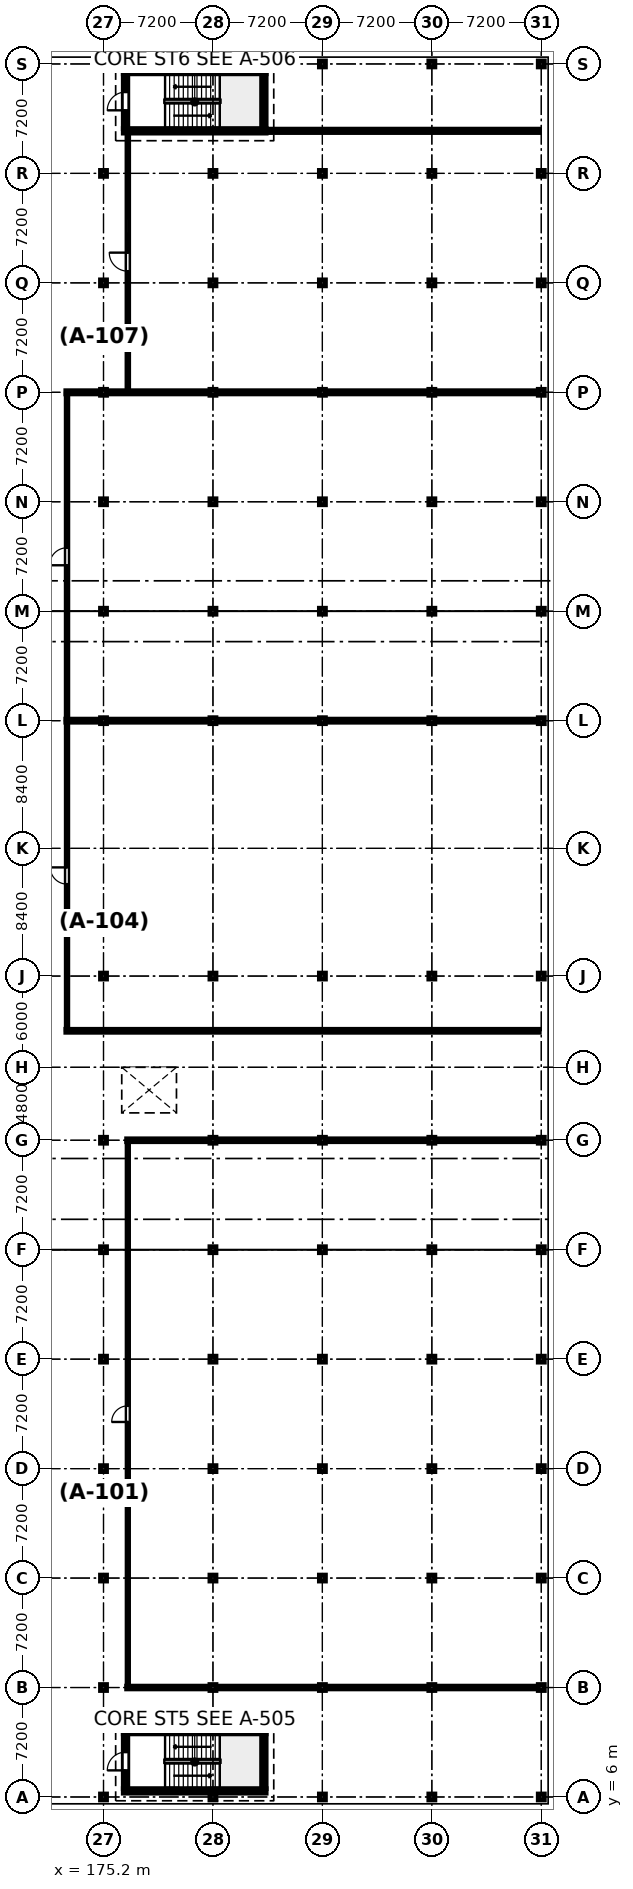
"""IFC4 building model, lengths in metres.
Left out: names, types, materials, properties, quantities, classifications, styles, units other than length and angle.
Written with IfcOpenShell. Run it as: python <this file> out.ifc"""

import sys

from ifc_helpers import new_model, si_unit, direction, frame, frame_2d, origin, origin_2d, place, context, subcontext, project, spatial, rectangle, i_section, extrude, element, fill, save


model = new_model("IFC4")
c1 = context("Model", 3, precision=1e-05, world=origin(), true_north=direction((0.0, 1.0)))
c2 = subcontext(c1, "Body", "Model", "MODEL_VIEW")
j1 = project(units=[si_unit("LENGTHUNIT", "METRE"), si_unit("PLANEANGLEUNIT", "RADIAN")], contexts=[c1])
p1 = place(None, origin())
s1 = spatial("IfcSite", under=j1, at=p1, CompositionType="ELEMENT")
p2 = place(p1, origin())
s2 = spatial("IfcBuilding", under=s1, at=p2, CompositionType="ELEMENT")
p3 = place(p2, frame((0.0, 0.0, -4.5)))
s3 = spatial("IfcBuildingStorey", under=s2, at=p3, CompositionType="ELEMENT", Elevation=-4.5)
for number, where, z_axis, x_axis in (
    (1, (175.2, 6.0, 0.0), (0.0, 0.0, 1.0), (1.0, 0.0, 0.0)),
    (2, (175.2, 13.2, 0.0), (0.0, 0.0, 1.0), (1.0, 0.0, 0.0)),
    (3, (175.2, 20.4, 0.0), (0.0, 0.0, 1.0), (1.0, 0.0, 0.0)),
    (4, (175.2, 27.6, 0.0), (0.0, 0.0, 1.0), (1.0, 0.0, 0.0)),
    (5, (175.2, 34.8, 0.0), (0.0, 0.0, 1.0), (1.0, 0.0, 0.0)),
    (6, (175.2, 42.0, 0.0), (0.0, 0.0, 1.0), (1.0, 0.0, 0.0)),
    (7, (175.2, 49.2, 0.0), (0.0, 0.0, 1.0), (1.0, 0.0, 0.0)),
    (8, (175.2, 60.0, 0.0), (0.0, 0.0, 1.0), (1.0, 0.0, 0.0)),
    (9, (175.2, 76.8, 0.0), (0.0, 0.0, 1.0), (1.0, 0.0, 0.0)),
    (10, (175.2, 84.0, 0.0), (0.0, 0.0, 1.0), (1.0, 0.0, 0.0)),
    (11, (175.2, 91.2, 0.0), (0.0, 0.0, 1.0), (1.0, 0.0, 0.0)),
    (12, (175.2, 98.4, 0.0), (0.0, 0.0, 1.0), (1.0, 0.0, 0.0)),
    (13, (175.2, 105.6, 0.0), (0.0, 0.0, 1.0), (1.0, 0.0, 0.0)),
    (14, (175.2, 112.8, 0.0), (0.0, 0.0, 1.0), (1.0, 0.0, 0.0)),
    (15, (175.2, 120.0, 0.0), (0.0, 0.0, 1.0), (1.0, 0.0, 0.0)),
    (16, (182.4, 6.0, 0.0), (0.0, 0.0, 1.0), (1.0, 0.0, 0.0)),
    (17, (182.4, 13.2, 0.0), (0.0, 0.0, 1.0), (1.0, 0.0, 0.0)),
    (18, (182.4, 20.4, 0.0), (0.0, 0.0, 1.0), (1.0, 0.0, 0.0)),
    (19, (182.4, 27.6, 0.0), (0.0, 0.0, 1.0), (1.0, 0.0, 0.0)),
    (20, (182.4, 34.8, 0.0), (0.0, 0.0, 1.0), (1.0, 0.0, 0.0)),
    (21, (182.4, 42.0, 0.0), (0.0, 0.0, 1.0), (1.0, 0.0, 0.0)),
    (22, (182.4, 49.2, 0.0), (0.0, 0.0, 1.0), (1.0, 0.0, 0.0)),
    (23, (182.4, 60.0, 0.0), (0.0, 0.0, 1.0), (1.0, 0.0, 0.0)),
    (24, (182.4, 76.8, 0.0), (0.0, 0.0, 1.0), (1.0, 0.0, 0.0)),
    (25, (182.4, 84.0, 0.0), (0.0, 0.0, 1.0), (1.0, 0.0, 0.0)),
    (26, (182.4, 91.2, 0.0), (0.0, 0.0, 1.0), (1.0, 0.0, 0.0)),
    (27, (182.4, 98.4, 0.0), (0.0, 0.0, 1.0), (1.0, 0.0, 0.0)),
    (28, (182.4, 105.6, 0.0), (0.0, 0.0, 1.0), (1.0, 0.0, 0.0)),
    (29, (182.4, 112.8, 0.0), (0.0, 0.0, 1.0), (1.0, 0.0, 0.0)),
    (30, (182.4, 120.0, 0.0), (0.0, 0.0, 1.0), (1.0, 0.0, 0.0)),
    (31, (189.6, 6.0, 0.0), (0.0, 0.0, 1.0), (1.0, 0.0, 0.0)),
    (32, (189.6, 13.2, 0.0), (0.0, 0.0, 1.0), (1.0, 0.0, 0.0)),
    (33, (189.6, 20.4, 0.0), (0.0, 0.0, 1.0), (1.0, 0.0, 0.0)),
    (34, (189.6, 27.6, 0.0), (0.0, 0.0, 1.0), (1.0, 0.0, 0.0)),
    (35, (189.6, 34.8, 0.0), (0.0, 0.0, 1.0), (1.0, 0.0, 0.0)),
    (36, (189.6, 42.0, 0.0), (0.0, 0.0, 1.0), (1.0, 0.0, 0.0)),
    (37, (189.6, 49.2, 0.0), (0.0, 0.0, 1.0), (1.0, 0.0, 0.0)),
    (38, (189.6, 60.0, 0.0), (0.0, 0.0, 1.0), (1.0, 0.0, 0.0)),
    (39, (189.6, 76.8, 0.0), (0.0, 0.0, 1.0), (1.0, 0.0, 0.0)),
    (40, (189.6, 84.0, 0.0), (0.0, 0.0, 1.0), (1.0, 0.0, 0.0)),
    (41, (189.6, 91.2, 0.0), (0.0, 0.0, 1.0), (1.0, 0.0, 0.0)),
    (42, (189.6, 98.4, 0.0), (0.0, 0.0, 1.0), (1.0, 0.0, 0.0)),
    (43, (189.6, 105.6, 0.0), (0.0, 0.0, 1.0), (1.0, 0.0, 0.0)),
    (44, (189.6, 112.8, 0.0), (0.0, 0.0, 1.0), (1.0, 0.0, 0.0)),
    (45, (189.6, 120.0, 0.0), (0.0, 0.0, 1.0), (1.0, 0.0, 0.0)),
    (46, (196.8, 6.0, 0.0), (0.0, 0.0, 1.0), (1.0, 0.0, 0.0)),
    (47, (196.8, 13.2, 0.0), (0.0, 0.0, 1.0), (1.0, 0.0, 0.0)),
    (48, (196.8, 20.4, 0.0), (0.0, 0.0, 1.0), (1.0, 0.0, 0.0)),
    (49, (196.8, 27.6, 0.0), (0.0, 0.0, 1.0), (1.0, 0.0, 0.0)),
    (50, (196.8, 34.8, 0.0), (0.0, 0.0, 1.0), (1.0, 0.0, 0.0)),
    (51, (196.8, 42.0, 0.0), (0.0, 0.0, 1.0), (1.0, 0.0, 0.0)),
    (52, (196.8, 49.2, 0.0), (0.0, 0.0, 1.0), (1.0, 0.0, 0.0)),
    (53, (196.8, 60.0, 0.0), (0.0, 0.0, 1.0), (1.0, 0.0, 0.0)),
    (54, (196.8, 76.8, 0.0), (0.0, 0.0, 1.0), (1.0, 0.0, 0.0)),
    (55, (196.8, 84.0, 0.0), (0.0, 0.0, 1.0), (1.0, 0.0, 0.0)),
    (56, (196.8, 91.2, 0.0), (0.0, 0.0, 1.0), (1.0, 0.0, 0.0)),
    (57, (196.8, 98.4, 0.0), (0.0, 0.0, 1.0), (1.0, 0.0, 0.0)),
    (58, (196.8, 105.6, 0.0), (0.0, 0.0, 1.0), (1.0, 0.0, 0.0)),
    (59, (196.8, 112.8, 0.0), (0.0, 0.0, 1.0), (1.0, 0.0, 0.0)),
    (60, (196.8, 120.0, 0.0), (0.0, 0.0, 1.0), (1.0, 0.0, 0.0)),
    (61, (204.0, 6.0, 0.0), (0.0, 0.0, 1.0), (1.0, 0.0, 0.0)),
    (62, (204.0, 13.2, 0.0), (0.0, 0.0, 1.0), (1.0, 0.0, 0.0)),
    (63, (204.0, 20.4, 0.0), (0.0, 0.0, 1.0), (1.0, 0.0, 0.0)),
    (64, (204.0, 27.6, 0.0), (0.0, 0.0, 1.0), (1.0, 0.0, 0.0)),
    (65, (204.0, 34.8, 0.0), (0.0, 0.0, 1.0), (1.0, 0.0, 0.0)),
    (66, (204.0, 42.0, 0.0), (0.0, 0.0, 1.0), (1.0, 0.0, 0.0)),
    (67, (204.0, 49.2, 0.0), (0.0, 0.0, 1.0), (1.0, 0.0, 0.0)),
    (68, (204.0, 60.0, 0.0), (0.0, 0.0, 1.0), (1.0, 0.0, 0.0)),
    (69, (204.0, 76.8, 0.0), (0.0, 0.0, 1.0), (1.0, 0.0, 0.0)),
    (70, (204.0, 84.0, 0.0), (0.0, 0.0, 1.0), (1.0, 0.0, 0.0)),
    (71, (204.0, 91.2, 0.0), (0.0, 0.0, 1.0), (1.0, 0.0, 0.0)),
    (72, (204.0, 98.4, 0.0), (0.0, 0.0, 1.0), (1.0, 0.0, 0.0)),
    (73, (204.0, 105.6, 0.0), (0.0, 0.0, 1.0), (1.0, 0.0, 0.0)),
    (74, (204.0, 112.8, 0.0), (0.0, 0.0, 1.0), (1.0, 0.0, 0.0)),
    (75, (204.0, 120.0, 0.0), (0.0, 0.0, 1.0), (1.0, 0.0, 0.0)),
):
    element("IfcColumn", number, at=place(p3, frame(where, z_axis=z_axis, x_axis=x_axis)), inside=s3, PredefinedType="COLUMN", context=c2, shape_type="SweptSolid", body=[
        extrude(i_section(OverallWidth=0.399, OverallDepth=0.394, WebThickness=0.023, FlangeThickness=0.037, FilletRadius=0.015, at=origin_2d()), origin(), (0.0, 0.0, 1.0), 4.5),
    ])
for number, where, z_axis, x_axis in (
    (76, (185.9, 6.4, 0.0), (0.0, 0.0, 1.0), (-1.0, 0.0, 0.0)),
    (77, (176.5, 10.3, 0.0), (0.0, 0.0, 1.0), (1.0, 0.0, 0.0)),
):
    element("IfcWall", number, at=place(p3, frame(where, z_axis=z_axis, x_axis=x_axis)), inside=s3, PredefinedType="SOLIDWALL", context=c2, shape_type="SweptSolid", body=[
        extrude(rectangle(XDim=9.4, YDim=0.3, at=frame_2d((4.7, 0.0))), origin(), (0.0, 0.0, 1.0), 4.18),
    ])
p4 = place(p3, frame((176.65, 6.55, 0.0), z_axis=(0.0, 0.0, 1.0), x_axis=(0.0, 1.0, 0.0)))
e78 = element("IfcWall", 78, at=p4, inside=s3, PredefinedType="SOLIDWALL", context=c2, shape_type="SweptSolid", body=[
    extrude(rectangle(XDim=3.6, YDim=0.3, at=frame_2d((1.8, 0.0))), origin(), (0.0, 0.0, 1.0), 4.18),
])
p5 = place(p4, frame((1.2, 0.0, 0.0)))
e79 = element("IfcOpeningElement", 79, at=p5, cuts=e78, PredefinedType="OPENING", context=c2, shape_type="SweptSolid", body=[
    extrude(rectangle(XDim=1.2, YDim=2.2, at=frame_2d((0.6, 1.1))), frame((0.0, 0.16, 0.0), z_axis=(0.0, -1.0, 0.0), x_axis=(1.0, 0.0, 0.0)), (0.0, 0.0, 1.0), 0.32),
])
p6 = place(p3, frame((185.75, 10.15, 0.0), z_axis=(0.0, 0.0, 1.0), x_axis=(0.0, -1.0, 0.0)))
e80 = element("IfcWall", 80, at=p6, inside=s3, PredefinedType="SOLIDWALL", context=c2, shape_type="SweptSolid", body=[
    extrude(rectangle(XDim=3.6, YDim=0.3, at=frame_2d((1.8, 0.0))), origin(), (0.0, 0.0, 1.0), 4.18),
])
for number, where, z_axis, x_axis in (
    (81, (185.9, 115.6, 0.0), (0.0, 0.0, 1.0), (-1.0, 0.0, 0.0)),
    (82, (176.5, 119.5, 0.0), (0.0, 0.0, 1.0), (1.0, 0.0, 0.0)),
):
    element("IfcWall", number, at=place(p3, frame(where, z_axis=z_axis, x_axis=x_axis)), inside=s3, PredefinedType="SOLIDWALL", context=c2, shape_type="SweptSolid", body=[
        extrude(rectangle(XDim=9.4, YDim=0.3, at=frame_2d((4.7, 0.0))), origin(), (0.0, 0.0, 1.0), 4.18),
    ])
p7 = place(p3, frame((176.65, 115.75, 0.0), z_axis=(0.0, 0.0, 1.0), x_axis=(0.0, 1.0, 0.0)))
e83 = element("IfcWall", 83, at=p7, inside=s3, PredefinedType="SOLIDWALL", context=c2, shape_type="SweptSolid", body=[
    extrude(rectangle(XDim=3.6, YDim=0.3, at=frame_2d((1.8, 0.0))), origin(), (0.0, 0.0, 1.0), 4.18),
])
p8 = place(p7, frame((1.2, 0.0, 0.0)))
e84 = element("IfcOpeningElement", 84, at=p8, cuts=e83, PredefinedType="OPENING", context=c2, shape_type="SweptSolid", body=[
    extrude(rectangle(XDim=1.2, YDim=2.2, at=frame_2d((0.6, 1.1))), frame((0.0, 0.16, 0.0), z_axis=(0.0, -1.0, 0.0), x_axis=(1.0, 0.0, 0.0)), (0.0, 0.0, 1.0), 0.32),
])
p9 = place(p3, frame((185.75, 119.35, 0.0), z_axis=(0.0, 0.0, 1.0), x_axis=(0.0, -1.0, 0.0)))
e85 = element("IfcWall", 85, at=p9, inside=s3, PredefinedType="SOLIDWALL", context=c2, shape_type="SweptSolid", body=[
    extrude(rectangle(XDim=3.6, YDim=0.3, at=frame_2d((1.8, 0.0))), origin(), (0.0, 0.0, 1.0), 4.18),
])
p10 = place(p3, frame((203.868, 13.2, 0.0), z_axis=(0.0, 0.0, 1.0), x_axis=(-1.0, 0.0, 0.0)))
e86 = element("IfcWall", 86, at=p10, inside=s3, PredefinedType="PARTITIONING", context=c2, shape_type="SweptSolid", body=[
    extrude(rectangle(XDim=27.148, YDim=0.185, at=frame_2d((13.574, 0.0))), origin(), (0.0, 0.0, 1.0), 3.403),
])
p11 = place(p3, frame((176.72, 49.2, 0.0), z_axis=(0.0, 0.0, 1.0), x_axis=(1.0, 0.0, 0.0)))
e87 = element("IfcWall", 87, at=p11, inside=s3, PredefinedType="PARTITIONING", context=c2, shape_type="SweptSolid", body=[
    extrude(rectangle(XDim=27.148, YDim=0.192, at=frame_2d((13.574, 0.0))), origin(), (0.0, 0.0, 1.0), 3.403),
])
p12 = place(p3, frame((203.868, 56.4, 0.0), z_axis=(0.0, 0.0, 1.0), x_axis=(-1.0, 0.0, 0.0)))
e88 = element("IfcWall", 88, at=p12, inside=s3, PredefinedType="PARTITIONING", context=c2, shape_type="SweptSolid", body=[
    extrude(rectangle(XDim=31.148, YDim=0.198, at=frame_2d((15.574, 0.0))), origin(), (0.0, 0.0, 1.0), 3.403),
])
p13 = place(p3, frame((172.72, 76.8, 0.0), z_axis=(0.0, 0.0, 1.0), x_axis=(1.0, 0.0, 0.0)))
e89 = element("IfcWall", 89, at=p13, inside=s3, PredefinedType="PARTITIONING", context=c2, shape_type="SweptSolid", body=[
    extrude(rectangle(XDim=31.148, YDim=0.205, at=frame_2d((15.574, 0.0))), origin(), (0.0, 0.0, 1.0), 3.403),
])
p14 = place(p3, frame((172.72, 98.4, 0.0), z_axis=(0.0, 0.0, 1.0), x_axis=(1.0, 0.0, 0.0)))
e90 = element("IfcWall", 90, at=p14, inside=s3, PredefinedType="PARTITIONING", context=c2, shape_type="SweptSolid", body=[
    extrude(rectangle(XDim=31.148, YDim=0.212, at=frame_2d((15.574, 0.0))), origin(), (0.0, 0.0, 1.0), 3.403),
])
p15 = place(p3, frame((185.902, 115.6, 0.0), z_axis=(0.0, 0.0, 1.0), x_axis=(1.0, 0.0, 0.0)))
e91 = element("IfcWall", 91, at=p15, inside=s3, PredefinedType="PARTITIONING", context=c2, shape_type="SweptSolid", body=[
    extrude(rectangle(XDim=17.966, YDim=0.225, at=frame_2d((8.983, 0.0))), origin(), (0.0, 0.0, 1.0), 3.403),
])
p16 = place(p3, frame((176.8, 13.294, 0.0), z_axis=(0.0, 0.0, 1.0), x_axis=(0.0, 1.0, 0.0)))
e92 = element("IfcWall", 92, at=p16, inside=s3, PredefinedType="PARTITIONING", context=c2, shape_type="SweptSolid", body=[
    extrude(rectangle(XDim=35.808, YDim=0.1, at=frame_2d((17.904, 0.0))), origin(), (0.0, 0.0, 1.0), 3.403),
])
p17 = place(p16, frame((17.374, 0.0, 0.0)))
e93 = element("IfcOpeningElement", 93, at=p17, cuts=e92, PredefinedType="OPENING", context=c2, shape_type="SweptSolid", body=[
    extrude(rectangle(XDim=1.06, YDim=2.1, at=frame_2d((0.53, 1.05))), frame((0.0, 0.06, 0.0), z_axis=(0.0, -1.0, 0.0), x_axis=(1.0, 0.0, 0.0)), (0.0, 0.0, 1.0), 0.12),
])
p18 = place(p3, frame((172.8, 56.501, 0.0), z_axis=(0.0, 0.0, 1.0), x_axis=(0.0, 1.0, 0.0)))
e94 = element("IfcWall", 94, at=p18, inside=s3, PredefinedType="PARTITIONING", context=c2, shape_type="SweptSolid", body=[
    extrude(rectangle(XDim=20.195, YDim=0.105, at=frame_2d((10.098, 0.0))), origin(), (0.0, 0.0, 1.0), 3.403),
])
p19 = place(p18, frame((9.548, 0.0, 0.0)))
e95 = element("IfcOpeningElement", 95, at=p19, cuts=e94, PredefinedType="OPENING", context=c2, shape_type="SweptSolid", body=[
    extrude(rectangle(XDim=1.1, YDim=2.1, at=frame_2d((0.55, 1.05))), frame((0.0, 0.062, 0.0), z_axis=(0.0, -1.0, 0.0), x_axis=(1.0, 0.0, 0.0)), (0.0, 0.0, 1.0), 0.125),
])
p20 = place(p3, frame((172.8, 76.904, 0.0), z_axis=(0.0, 0.0, 1.0), x_axis=(0.0, 1.0, 0.0)))
e96 = element("IfcWall", 96, at=p20, inside=s3, PredefinedType="PARTITIONING", context=c2, shape_type="SweptSolid", body=[
    extrude(rectangle(XDim=21.388, YDim=0.11, at=frame_2d((10.694, 0.0))), origin(), (0.0, 0.0, 1.0), 3.403),
])
p21 = place(p20, frame((10.119, 0.0, 0.0)))
e97 = element("IfcOpeningElement", 97, at=p21, cuts=e96, PredefinedType="OPENING", context=c2, shape_type="SweptSolid", body=[
    extrude(rectangle(XDim=1.15, YDim=2.1, at=frame_2d((0.575, 1.05))), frame((0.0, 0.065, 0.0), z_axis=(0.0, -1.0, 0.0), x_axis=(1.0, 0.0, 0.0)), (0.0, 0.0, 1.0), 0.13),
])
p22 = place(p3, frame((176.8, 98.508, 0.0), z_axis=(0.0, 0.0, 1.0), x_axis=(0.0, 1.0, 0.0)))
e98 = element("IfcWall", 98, at=p22, inside=s3, PredefinedType="PARTITIONING", context=c2, shape_type="SweptSolid", body=[
    extrude(rectangle(XDim=16.94, YDim=0.115, at=frame_2d((8.47, 0.0))), origin(), (0.0, 0.0, 1.0), 3.403),
])
p23 = place(p22, frame((7.86, 0.0, 0.0)))
e99 = element("IfcOpeningElement", 99, at=p23, cuts=e98, PredefinedType="OPENING", context=c2, shape_type="SweptSolid", body=[
    extrude(rectangle(XDim=1.22, YDim=2.1, at=frame_2d((0.61, 1.05))), frame((0.0, 0.067, 0.0), z_axis=(0.0, -1.0, 0.0), x_axis=(1.0, 0.0, 0.0)), (0.0, 0.0, 1.0), 0.135),
])
p24 = place(p22, frame((10.33, 0.0, 0.95)))
e100 = element("IfcOpeningElement", 100, at=p24, cuts=e98, PredefinedType="OPENING", context=c2, shape_type="SweptSolid", body=[
    extrude(rectangle(XDim=1.0, YDim=1.0, at=frame_2d((0.5, 0.5))), frame((0.0, 0.067, 0.0), z_axis=(0.0, -1.0, 0.0), x_axis=(1.0, 0.0, 0.0)), (0.0, 0.0, 1.0), 0.135),
])
p25 = place(p5, origin())
e101 = element("IfcDoor", 101, at=p25, inside=s3, OperationType="SINGLE_SWING_LEFT", PredefinedType="DOOR", context=c2, shape_type="SweptSolid", body=[
    extrude(rectangle(XDim=1.2, YDim=2.2, at=frame_2d((0.6, 1.1))), frame((0.0, 0.025, 0.0), z_axis=(0.0, -1.0, 0.0), x_axis=(1.0, 0.0, 0.0)), (0.0, 0.0, 1.0), 0.05),
])
fill(e79, e101)
p26 = place(p8, origin())
e102 = element("IfcDoor", 102, at=p26, inside=s3, OperationType="SINGLE_SWING_LEFT", PredefinedType="DOOR", context=c2, shape_type="SweptSolid", body=[
    extrude(rectangle(XDim=1.2, YDim=2.2, at=frame_2d((0.6, 1.1))), frame((0.0, 0.025, 0.0), z_axis=(0.0, -1.0, 0.0), x_axis=(1.0, 0.0, 0.0)), (0.0, 0.0, 1.0), 0.05),
])
fill(e84, e102)
p27 = place(p17, origin())
e103 = element("IfcDoor", 103, at=p27, inside=s3, OperationType="SINGLE_SWING_LEFT", PredefinedType="DOOR", context=c2, shape_type="SweptSolid", body=[
    extrude(rectangle(XDim=1.06, YDim=2.1, at=frame_2d((0.53, 1.05))), frame((0.0, 0.025, 0.0), z_axis=(0.0, -1.0, 0.0), x_axis=(1.0, 0.0, 0.0)), (0.0, 0.0, 1.0), 0.05),
])
fill(e93, e103)
p28 = place(p19, origin())
e104 = element("IfcDoor", 104, at=p28, inside=s3, OperationType="SINGLE_SWING_RIGHT", PredefinedType="DOOR", context=c2, shape_type="SweptSolid", body=[
    extrude(rectangle(XDim=1.1, YDim=2.1, at=frame_2d((0.55, 1.05))), frame((0.0, 0.025, 0.0), z_axis=(0.0, -1.0, 0.0), x_axis=(1.0, 0.0, 0.0)), (0.0, 0.0, 1.0), 0.05),
])
fill(e95, e104)
p29 = place(p21, origin())
e105 = element("IfcDoor", 105, at=p29, inside=s3, OperationType="SINGLE_SWING_LEFT", PredefinedType="DOOR", context=c2, shape_type="SweptSolid", body=[
    extrude(rectangle(XDim=1.15, YDim=2.1, at=frame_2d((0.575, 1.05))), frame((0.0, 0.025, 0.0), z_axis=(0.0, -1.0, 0.0), x_axis=(1.0, 0.0, 0.0)), (0.0, 0.0, 1.0), 0.05),
])
fill(e97, e105)
p30 = place(p23, origin())
e106 = element("IfcDoor", 106, at=p30, inside=s3, OperationType="SINGLE_SWING_RIGHT", PredefinedType="DOOR", context=c2, shape_type="SweptSolid", body=[
    extrude(rectangle(XDim=1.22, YDim=2.1, at=frame_2d((0.61, 1.05))), frame((0.0, 0.025, 0.0), z_axis=(0.0, -1.0, 0.0), x_axis=(1.0, 0.0, 0.0)), (0.0, 0.0, 1.0), 0.05),
])
fill(e99, e106)
p31 = place(p24, origin())
e107 = element("IfcWindow", 107, at=p31, inside=s3, PartitioningType="SINGLE_PANEL", PredefinedType="WINDOW", context=c2, shape_type="SweptSolid", body=[
    extrude(rectangle(XDim=1.0, YDim=1.0, at=frame_2d((0.5, 0.5))), frame((0.0, 0.03, 0.0), z_axis=(0.0, -1.0, 0.0), x_axis=(1.0, 0.0, 0.0)), (0.0, 0.0, 1.0), 0.06),
])
fill(e100, e107)
save(model, sys.argv[1])
